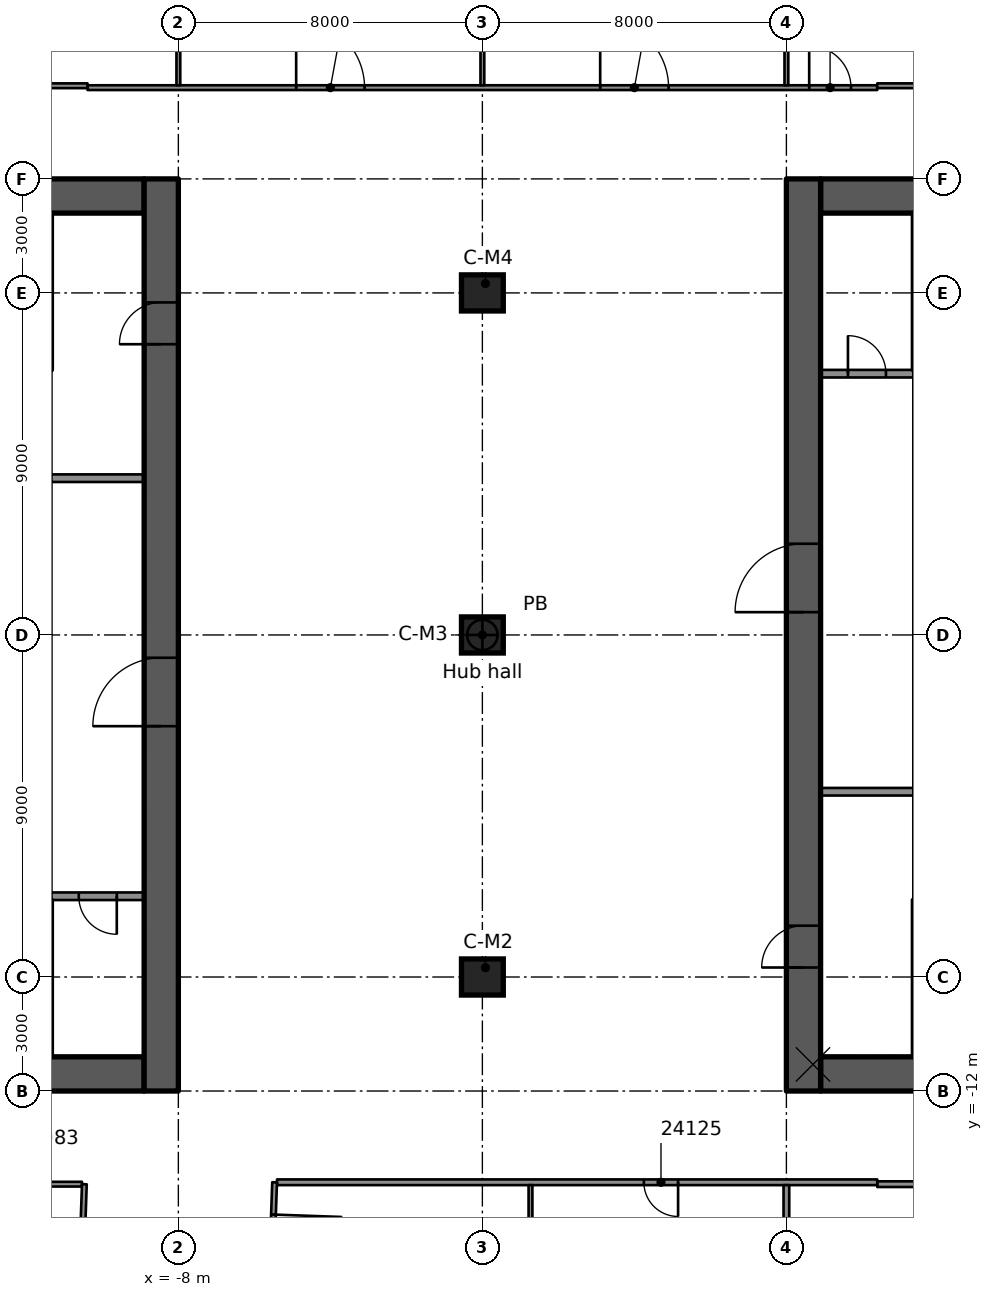
"""IFC4 building model, lengths in metres.
Left out: names, types, materials, properties, quantities, classifications, styles, units other than length and angle.
Written with IfcOpenShell. Run it as: python <this file> out.ifc"""

import sys

from ifc_helpers import new_model, si_unit, direction, frame, frame_2d, origin, origin_2d, place, context, subcontext, project, spatial, rectangle, extrude, element, fill, save


model = new_model("IFC4")
c1 = context("Model", 3, precision=1e-05, world=origin(), true_north=direction((0.0, 1.0)))
c2 = subcontext(c1, "Body", "Model", "MODEL_VIEW")
j1 = project(units=[si_unit("LENGTHUNIT", "METRE"), si_unit("PLANEANGLEUNIT", "RADIAN")], contexts=[c1])
p1 = place(None, origin())
s1 = spatial("IfcSite", under=j1, at=p1, CompositionType="ELEMENT")
p2 = place(p1, origin())
s2 = spatial("IfcBuilding", under=s1, at=p2, CompositionType="ELEMENT")
p3 = place(p2, frame((0.0, 0.0, 123.7)))
s3 = spatial("IfcBuildingStorey", under=s2, at=p3, CompositionType="ELEMENT", Elevation=123.7)
p4 = place(p3, frame((-18.1, 11.55, 0.0), z_axis=(0.0, 0.0, 1.0), x_axis=(1.0, 0.0, 0.0)))
e1 = element("IfcWall", 1, at=p4, inside=s3, PredefinedType="SHEAR", context=c2, shape_type="SweptSolid", body=[
    extrude(rectangle(XDim=9.2, YDim=0.9, at=frame_2d((4.6, 0.0))), origin(), (0.0, 0.0, 1.0), 3.5),
])
p5 = place(p4, frame((5.1, 0.0, 0.0)))
e2 = element("IfcOpeningElement", 2, at=p5, cuts=e1, PredefinedType="OPENING", context=c2, shape_type="SweptSolid", body=[
    extrude(rectangle(XDim=1.1, YDim=2.1, at=frame_2d((0.55, 1.05))), frame((0.0, 0.46, 0.0), z_axis=(0.0, -1.0, 0.0), x_axis=(1.0, 0.0, 0.0)), (0.0, 0.0, 1.0), 0.92),
])
p6 = place(p3, frame((-18.1, -11.55, 0.0), z_axis=(0.0, 0.0, 1.0), x_axis=(1.0, 0.0, 0.0)))
e3 = element("IfcWall", 3, at=p6, inside=s3, PredefinedType="SHEAR", context=c2, shape_type="SweptSolid", body=[
    extrude(rectangle(XDim=9.2, YDim=0.9, at=frame_2d((4.6, 0.0))), origin(), (0.0, 0.0, 1.0), 3.5),
])
p7 = place(p6, frame((5.1, 0.0, 0.0)))
e4 = element("IfcOpeningElement", 4, at=p7, cuts=e3, PredefinedType="OPENING", context=c2, shape_type="SweptSolid", body=[
    extrude(rectangle(XDim=1.1, YDim=2.1, at=frame_2d((0.55, 1.05))), frame((0.0, 0.46, 0.0), z_axis=(0.0, -1.0, 0.0), x_axis=(1.0, 0.0, 0.0)), (0.0, 0.0, 1.0), 0.92),
])
p8 = place(p3, frame((-8.45, -12.0, 0.0), z_axis=(0.0, 0.0, 1.0), x_axis=(0.0, 1.0, 0.0)))
e5 = element("IfcWall", 5, at=p8, inside=s3, PredefinedType="SHEAR", context=c2, shape_type="SweptSolid", body=[
    extrude(rectangle(XDim=24.0, YDim=0.9, at=frame_2d((12.0, 0.0))), origin(), (0.0, 0.0, 1.0), 3.5),
])
p9 = place(p8, frame((9.6, 0.0, 0.0)))
e6 = element("IfcOpeningElement", 6, at=p9, cuts=e5, PredefinedType="OPENING", context=c2, shape_type="SweptSolid", body=[
    extrude(rectangle(XDim=1.8, YDim=2.1, at=frame_2d((0.9, 1.05))), frame((0.0, 0.46, 0.0), z_axis=(0.0, -1.0, 0.0), x_axis=(1.0, 0.0, 0.0)), (0.0, 0.0, 1.0), 0.92),
])
p10 = place(p8, frame((19.65, 0.0, 0.0)))
e7 = element("IfcOpeningElement", 7, at=p10, cuts=e5, PredefinedType="OPENING", context=c2, shape_type="SweptSolid", body=[
    extrude(rectangle(XDim=1.1, YDim=2.1, at=frame_2d((0.55, 1.05))), frame((0.0, 0.46, 0.0), z_axis=(0.0, -1.0, 0.0), x_axis=(1.0, 0.0, 0.0)), (0.0, 0.0, 1.0), 0.92),
])
p11 = place(p3, frame((8.9, 11.55, 0.0), z_axis=(0.0, 0.0, 1.0), x_axis=(1.0, 0.0, 0.0)))
e8 = element("IfcWall", 8, at=p11, inside=s3, PredefinedType="SHEAR", context=c2, shape_type="SweptSolid", body=[
    extrude(rectangle(XDim=9.2, YDim=0.9, at=frame_2d((4.6, 0.0))), origin(), (0.0, 0.0, 1.0), 3.5),
])
p12 = place(p11, frame((3.0, 0.0, 0.0)))
e9 = element("IfcOpeningElement", 9, at=p12, cuts=e8, PredefinedType="OPENING", context=c2, shape_type="SweptSolid", body=[
    extrude(rectangle(XDim=1.1, YDim=2.1, at=frame_2d((0.55, 1.05))), frame((0.0, 0.46, 0.0), z_axis=(0.0, -1.0, 0.0), x_axis=(1.0, 0.0, 0.0)), (0.0, 0.0, 1.0), 0.92),
])
p13 = place(p3, frame((8.9, -11.55, 0.0), z_axis=(0.0, 0.0, 1.0), x_axis=(1.0, 0.0, 0.0)))
e10 = element("IfcWall", 10, at=p13, inside=s3, PredefinedType="SHEAR", context=c2, shape_type="SweptSolid", body=[
    extrude(rectangle(XDim=9.2, YDim=0.9, at=frame_2d((4.6, 0.0))), origin(), (0.0, 0.0, 1.0), 3.5),
])
p14 = place(p13, frame((3.0, 0.0, 0.0)))
e11 = element("IfcOpeningElement", 11, at=p14, cuts=e10, PredefinedType="OPENING", context=c2, shape_type="SweptSolid", body=[
    extrude(rectangle(XDim=1.1, YDim=2.1, at=frame_2d((0.55, 1.05))), frame((0.0, 0.46, 0.0), z_axis=(0.0, -1.0, 0.0), x_axis=(1.0, 0.0, 0.0)), (0.0, 0.0, 1.0), 0.92),
])
p15 = place(p3, frame((8.45, -12.0, 0.0), z_axis=(0.0, 0.0, 1.0), x_axis=(0.0, 1.0, 0.0)))
e12 = element("IfcWall", 12, at=p15, inside=s3, PredefinedType="SHEAR", context=c2, shape_type="SweptSolid", body=[
    extrude(rectangle(XDim=24.0, YDim=0.9, at=frame_2d((12.0, 0.0))), origin(), (0.0, 0.0, 1.0), 3.5),
])
p16 = place(p15, frame((12.6, 0.0, 0.0)))
e13 = element("IfcOpeningElement", 13, at=p16, cuts=e12, PredefinedType="OPENING", context=c2, shape_type="SweptSolid", body=[
    extrude(rectangle(XDim=1.8, YDim=2.1, at=frame_2d((0.9, 1.05))), frame((0.0, 0.46, 0.0), z_axis=(0.0, -1.0, 0.0), x_axis=(1.0, 0.0, 0.0)), (0.0, 0.0, 1.0), 0.92),
])
p17 = place(p15, frame((3.25, 0.0, 0.0)))
e14 = element("IfcOpeningElement", 14, at=p17, cuts=e12, PredefinedType="OPENING", context=c2, shape_type="SweptSolid", body=[
    extrude(rectangle(XDim=1.1, YDim=2.1, at=frame_2d((0.55, 1.05))), frame((0.0, 0.46, 0.0), z_axis=(0.0, -1.0, 0.0), x_axis=(1.0, 0.0, 0.0)), (0.0, 0.0, 1.0), 0.92),
])
for number, where, z_axis, x_axis in (
    (15, (0.0, -9.0, 0.0), (0.0, 0.0, 1.0), (1.0, 0.0, 0.0)),
    (16, (0.0, 0.0, 0.0), (0.0, 0.0, 1.0), (1.0, 0.0, 0.0)),
    (17, (0.0, 9.0, 0.0), (0.0, 0.0, 1.0), (1.0, 0.0, 0.0)),
):
    element("IfcColumn", number, at=place(p3, frame(where, z_axis=z_axis, x_axis=x_axis)), inside=s3, PredefinedType="COLUMN", context=c2, shape_type="SweptSolid", body=[
        extrude(rectangle(XDim=1.1, YDim=0.95, at=origin_2d()), origin(), (0.0, 0.0, 1.0), 3.5),
    ])
p18 = place(p3, frame((-8.9, 4.125, 0.0), z_axis=(0.0, 0.0, 1.0), x_axis=(-1.0, 0.0, 0.0)))
e18 = element("IfcWall", 18, at=p18, inside=s3, PredefinedType="PARTITIONING", context=c2, shape_type="SweptSolid", body=[
    extrude(rectangle(XDim=2.44, YDim=0.2, at=frame_2d((1.22, 0.0))), origin(), (0.0, 0.0, 1.0), 3.09),
])
p19 = place(p3, frame((-8.9, -6.875, 0.0), z_axis=(0.0, 0.0, 1.0), x_axis=(-1.0, 0.0, 0.0)))
e19 = element("IfcWall", 19, at=p19, inside=s3, PredefinedType="PARTITIONING", context=c2, shape_type="SweptSolid", body=[
    extrude(rectangle(XDim=2.44, YDim=0.2, at=frame_2d((1.22, 0.0))), origin(), (0.0, 0.0, 1.0), 3.09),
])
p20 = place(p19, frame((0.72, 0.0, 0.0)))
e20 = element("IfcOpeningElement", 20, at=p20, cuts=e19, PredefinedType="OPENING", context=c2, shape_type="SweptSolid", body=[
    extrude(rectangle(XDim=1.0, YDim=2.1, at=frame_2d((0.5, 1.05))), frame((0.0, 0.11, 0.0), z_axis=(0.0, -1.0, 0.0), x_axis=(1.0, 0.0, 0.0)), (0.0, 0.0, 1.0), 0.22),
])
p21 = place(p3, frame((8.9, -4.125, 0.0), z_axis=(0.0, 0.0, 1.0), x_axis=(1.0, 0.0, 0.0)))
e21 = element("IfcWall", 21, at=p21, inside=s3, PredefinedType="PARTITIONING", context=c2, shape_type="SweptSolid", body=[
    extrude(rectangle(XDim=2.44, YDim=0.2, at=frame_2d((1.22, 0.0))), origin(), (0.0, 0.0, 1.0), 3.09),
])
p22 = place(p3, frame((8.9, 6.875, 0.0), z_axis=(0.0, 0.0, 1.0), x_axis=(1.0, 0.0, 0.0)))
e22 = element("IfcWall", 22, at=p22, inside=s3, PredefinedType="PARTITIONING", context=c2, shape_type="SweptSolid", body=[
    extrude(rectangle(XDim=2.44, YDim=0.2, at=frame_2d((1.22, 0.0))), origin(), (0.0, 0.0, 1.0), 3.09),
])
p23 = place(p22, frame((0.72, 0.0, 0.0)))
e23 = element("IfcOpeningElement", 23, at=p23, cuts=e22, PredefinedType="OPENING", context=c2, shape_type="SweptSolid", body=[
    extrude(rectangle(XDim=1.0, YDim=2.1, at=frame_2d((0.5, 1.05))), frame((0.0, 0.11, 0.0), z_axis=(0.0, -1.0, 0.0), x_axis=(1.0, 0.0, 0.0)), (0.0, 0.0, 1.0), 0.22),
])
p24 = place(p3, frame((-14.595, -14.451, 0.0), z_axis=(0.0, 0.0, 1.0), x_axis=(1.0, 0.0, 0.0)))
e24 = element("IfcWall", 24, at=p24, inside=s3, PredefinedType="PARTITIONING", context=c2, shape_type="SweptSolid", body=[
    extrude(rectangle(XDim=4.059, YDim=0.125, at=frame_2d((2.03, 0.0))), origin(), (0.0, 0.0, 1.0), 3.08),
])
p25 = place(p3, frame((21.387, -14.451, 0.0), z_axis=(0.0, 0.0, 1.0), x_axis=(-1.0, 0.0, 0.0)))
e25 = element("IfcWall", 25, at=p25, inside=s3, PredefinedType="PARTITIONING", context=c2, shape_type="SweptSolid", body=[
    extrude(rectangle(XDim=10.996, YDim=0.15, at=frame_2d((5.498, 0.0))), origin(), (0.0, 0.0, 1.0), 3.08),
])
p26 = place(p25, frame((7.816, 0.0, 0.0)))
e26 = element("IfcOpeningElement", 26, at=p26, cuts=e25, PredefinedType="OPENING", context=c2, shape_type="SweptSolid", body=[
    extrude(rectangle(XDim=0.9, YDim=2.1, at=frame_2d((0.45, 1.05))), frame((0.0, 0.085, 0.0), z_axis=(0.0, -1.0, 0.0), x_axis=(1.0, 0.0, 0.0)), (0.0, 0.0, 1.0), 0.17),
])
p27 = place(p25, frame((2.288, 0.0, 0.0)))
e27 = element("IfcOpeningElement", 27, at=p27, cuts=e25, PredefinedType="OPENING", context=c2, shape_type="SweptSolid", body=[
    extrude(rectangle(XDim=0.9, YDim=2.1, at=frame_2d((0.45, 1.05))), frame((0.0, 0.085, 0.0), z_axis=(0.0, -1.0, 0.0), x_axis=(1.0, 0.0, 0.0)), (0.0, 0.0, 1.0), 0.17),
])
p28 = place(p3, frame((10.391, -14.401, 0.0), z_axis=(0.0, 0.0, 1.0), x_axis=(-1.0, 0.0, 0.0)))
e28 = element("IfcWall", 28, at=p28, inside=s3, PredefinedType="PARTITIONING", context=c2, shape_type="SweptSolid", body=[
    extrude(rectangle(XDim=15.795, YDim=0.15, at=frame_2d((7.897, 0.0))), origin(), (0.0, 0.0, 1.0), 3.08),
])
p29 = place(p28, frame((5.241, 0.0, 0.0)))
e29 = element("IfcOpeningElement", 29, at=p29, cuts=e28, PredefinedType="OPENING", context=c2, shape_type="SweptSolid", body=[
    extrude(rectangle(XDim=0.9, YDim=2.1, at=frame_2d((0.45, 1.05))), frame((0.0, 0.085, 0.0), z_axis=(0.0, -1.0, 0.0), x_axis=(1.0, 0.0, 0.0)), (0.0, 0.0, 1.0), 0.17),
])
p30 = place(p3, frame((-10.39, 14.401, 0.0), z_axis=(0.0, 0.0, 1.0), x_axis=(1.0, 0.0, 0.0)))
e30 = element("IfcWall", 30, at=p30, inside=s3, PredefinedType="PARTITIONING", context=c2, shape_type="SweptSolid", body=[
    extrude(rectangle(XDim=20.781, YDim=0.125, at=frame_2d((10.391, 0.0))), origin(), (0.0, 0.0, 1.0), 3.08),
])
p31 = place(p30, frame((18.99, 0.0, 0.0)))
e31 = element("IfcOpeningElement", 31, at=p31, cuts=e30, PredefinedType="OPENING", context=c2, shape_type="SweptSolid", body=[
    extrude(rectangle(XDim=1.1, YDim=2.1, at=frame_2d((0.55, 1.05))), frame((0.0, 0.073, 0.0), z_axis=(0.0, -1.0, 0.0), x_axis=(1.0, 0.0, 0.0)), (0.0, 0.0, 1.0), 0.145),
])
p32 = place(p30, frame((13.49, 0.0, 0.0)))
e32 = element("IfcOpeningElement", 32, at=p32, cuts=e30, PredefinedType="OPENING", context=c2, shape_type="SweptSolid", body=[
    extrude(rectangle(XDim=1.8, YDim=2.1, at=frame_2d((0.9, 1.05))), frame((0.0, 0.073, 0.0), z_axis=(0.0, -1.0, 0.0), x_axis=(1.0, 0.0, 0.0)), (0.0, 0.0, 1.0), 0.145),
])
p33 = place(p30, frame((5.49, 0.0, 0.0)))
e33 = element("IfcOpeningElement", 33, at=p33, cuts=e30, PredefinedType="OPENING", context=c2, shape_type="SweptSolid", body=[
    extrude(rectangle(XDim=1.8, YDim=2.1, at=frame_2d((0.9, 1.05))), frame((0.0, 0.073, 0.0), z_axis=(0.0, -1.0, 0.0), x_axis=(1.0, 0.0, 0.0)), (0.0, 0.0, 1.0), 0.145),
])
p34 = place(p3, frame((-21.387, 14.451, 0.0), z_axis=(0.0, 0.0, 1.0), x_axis=(1.0, 0.0, 0.0)))
e34 = element("IfcWall", 34, at=p34, inside=s3, PredefinedType="PARTITIONING", context=c2, shape_type="SweptSolid", body=[
    extrude(rectangle(XDim=10.996, YDim=0.125, at=frame_2d((5.498, 0.0))), origin(), (0.0, 0.0, 1.0), 3.08),
])
p35 = place(p34, frame((4.538, 0.0, 0.0)))
e35 = element("IfcOpeningElement", 35, at=p35, cuts=e34, PredefinedType="OPENING", context=c2, shape_type="SweptSolid", body=[
    extrude(rectangle(XDim=1.8, YDim=2.1, at=frame_2d((0.9, 1.05))), frame((0.0, 0.073, 0.0), z_axis=(0.0, -1.0, 0.0), x_axis=(1.0, 0.0, 0.0)), (0.0, 0.0, 1.0), 0.145),
])
p36 = place(p3, frame((10.391, 14.451, 0.0), z_axis=(0.0, 0.0, 1.0), x_axis=(1.0, 0.0, 0.0)))
e36 = element("IfcWall", 36, at=p36, inside=s3, PredefinedType="PARTITIONING", context=c2, shape_type="SweptSolid", body=[
    extrude(rectangle(XDim=10.996, YDim=0.125, at=frame_2d((5.498, 0.0))), origin(), (0.0, 0.0, 1.0), 3.08),
])
p37 = place(p3, frame((-5.467, -14.401, 0.0), z_axis=(0.0, 0.0, 1.0), x_axis=(-0.035380519418, -0.999373913431, 0.0)))
e37 = element("IfcWall", 37, at=p37, inside=s3, PredefinedType="PARTITIONING", context=c2, shape_type="SweptSolid", body=[
    extrude(rectangle(XDim=2.912, YDim=0.125, at=frame_2d((1.456, 0.0))), origin(), (0.0, 0.0, 1.0), 3.08),
])
p38 = place(p37, frame((0.85, 0.0, 0.0)))
e38 = element("IfcOpeningElement", 38, at=p38, cuts=e37, PredefinedType="OPENING", context=c2, shape_type="SweptSolid", body=[
    extrude(rectangle(XDim=1.8, YDim=2.1, at=frame_2d((0.9, 1.05))), frame((0.0, 0.073, 0.0), z_axis=(0.0, -1.0, 0.0), x_axis=(1.0, 0.0, 0.0)), (0.0, 0.0, 1.0), 0.145),
])
p39 = place(p3, frame((-10.873, -25.813, 0.0), z_axis=(0.0, 0.0, 1.0), x_axis=(0.035198976063, 0.999380324043, 0.0)))
e39 = element("IfcWall", 39, at=p39, inside=s3, PredefinedType="PARTITIONING", context=c2, shape_type="SweptSolid", body=[
    extrude(rectangle(XDim=11.368, YDim=0.125, at=frame_2d((5.684, 0.0))), origin(), (0.0, 0.0, 1.0), 3.08),
])
p40 = place(p39, frame((3.6, 0.0, 0.0)))
e40 = element("IfcOpeningElement", 40, at=p40, cuts=e39, PredefinedType="OPENING", context=c2, shape_type="SweptSolid", body=[
    extrude(rectangle(XDim=0.9, YDim=2.1, at=frame_2d((0.45, 1.05))), frame((0.0, 0.073, 0.0), z_axis=(0.0, -1.0, 0.0), x_axis=(1.0, 0.0, 0.0)), (0.0, 0.0, 1.0), 0.145),
])
p41 = place(p3, frame((8.0, -31.635, 0.0), z_axis=(0.0, 0.0, 1.0), x_axis=(0.0, 1.0, 0.0)))
e41 = element("IfcWall", 41, at=p41, inside=s3, PredefinedType="PARTITIONING", context=c2, shape_type="SweptSolid", body=[
    extrude(rectangle(XDim=17.159, YDim=0.15, at=frame_2d((8.58, 0.0))), origin(), (0.0, 0.0, 1.0), 3.08),
])
p42 = place(p3, frame((8.0, 14.463, 0.0), z_axis=(0.0, 0.0, 1.0), x_axis=(0.0, 1.0, 0.0)))
e42 = element("IfcWall", 42, at=p42, inside=s3, PredefinedType="PARTITIONING", context=c2, shape_type="SweptSolid", body=[
    extrude(rectangle(XDim=14.719, YDim=0.1, at=frame_2d((7.359, 0.0))), origin(), (0.0, 0.0, 1.0), 3.08),
])
p43 = place(p3, frame((1.266, -35.229, 0.0), z_axis=(0.0, 0.0, 1.0), x_axis=(0.0, 1.0, 0.0)))
e43 = element("IfcWall", 43, at=p43, inside=s3, PredefinedType="PARTITIONING", context=c2, shape_type="SweptSolid", body=[
    extrude(rectangle(XDim=20.753, YDim=0.1, at=frame_2d((10.376, 0.0))), origin(), (0.0, 0.0, 1.0), 3.08),
])
p44 = place(p3, frame((0.0, 14.463, 0.0), z_axis=(0.0, 0.0, 1.0), x_axis=(0.0, 1.0, 0.0)))
e44 = element("IfcWall", 44, at=p44, inside=s3, PredefinedType="PARTITIONING", context=c2, shape_type="SweptSolid", body=[
    extrude(rectangle(XDim=17.114, YDim=0.1, at=frame_2d((8.557, 0.0))), origin(), (0.0, 0.0, 1.0), 3.08),
])
p45 = place(p3, frame((-8.0, 14.463, 0.0), z_axis=(0.0, 0.0, 1.0), x_axis=(0.0, 1.0, 0.0)))
e45 = element("IfcWall", 45, at=p45, inside=s3, PredefinedType="PARTITIONING", context=c2, shape_type="SweptSolid", body=[
    extrude(rectangle(XDim=15.591, YDim=0.1, at=frame_2d((7.795, 0.0))), origin(), (0.0, 0.0, 1.0), 3.08),
])
p46 = place(p9, origin())
e46 = element("IfcDoor", 46, at=p46, inside=s3, OperationType="SINGLE_SWING_LEFT", PredefinedType="DOOR", context=c2, shape_type="SweptSolid", body=[
    extrude(rectangle(XDim=1.8, YDim=2.1, at=frame_2d((0.9, 1.05))), frame((0.0, 0.025, 0.0), z_axis=(0.0, -1.0, 0.0), x_axis=(1.0, 0.0, 0.0)), (0.0, 0.0, 1.0), 0.05),
])
fill(e6, e46)
p47 = place(p10, origin())
e47 = element("IfcDoor", 47, at=p47, inside=s3, OperationType="SINGLE_SWING_RIGHT", PredefinedType="DOOR", context=c2, shape_type="SweptSolid", body=[
    extrude(rectangle(XDim=1.1, YDim=2.1, at=frame_2d((0.55, 1.05))), frame((0.0, 0.025, 0.0), z_axis=(0.0, -1.0, 0.0), x_axis=(1.0, 0.0, 0.0)), (0.0, 0.0, 1.0), 0.05),
])
fill(e7, e47)
p48 = place(p20, origin())
e48 = element("IfcDoor", 48, at=p48, inside=s3, OperationType="SINGLE_SWING_RIGHT", PredefinedType="DOOR", context=c2, shape_type="SweptSolid", body=[
    extrude(rectangle(XDim=1.0, YDim=2.1, at=frame_2d((0.5, 1.05))), frame((0.0, 0.025, 0.0), z_axis=(0.0, -1.0, 0.0), x_axis=(1.0, 0.0, 0.0)), (0.0, 0.0, 1.0), 0.05),
])
fill(e20, e48)
p49 = place(p16, origin())
e49 = element("IfcDoor", 49, at=p49, inside=s3, OperationType="SINGLE_SWING_RIGHT", PredefinedType="DOOR", context=c2, shape_type="SweptSolid", body=[
    extrude(rectangle(XDim=1.8, YDim=2.1, at=frame_2d((0.9, 1.05))), frame((0.0, 0.025, 0.0), z_axis=(0.0, -1.0, 0.0), x_axis=(1.0, 0.0, 0.0)), (0.0, 0.0, 1.0), 0.05),
])
fill(e13, e49)
p50 = place(p17, origin())
e50 = element("IfcDoor", 50, at=p50, inside=s3, OperationType="SINGLE_SWING_LEFT", PredefinedType="DOOR", context=c2, shape_type="SweptSolid", body=[
    extrude(rectangle(XDim=1.1, YDim=2.1, at=frame_2d((0.55, 1.05))), frame((0.0, 0.025, 0.0), z_axis=(0.0, -1.0, 0.0), x_axis=(1.0, 0.0, 0.0)), (0.0, 0.0, 1.0), 0.05),
])
fill(e14, e50)
p51 = place(p23, origin())
e51 = element("IfcDoor", 51, at=p51, inside=s3, OperationType="SINGLE_SWING_RIGHT", PredefinedType="DOOR", context=c2, shape_type="SweptSolid", body=[
    extrude(rectangle(XDim=1.0, YDim=2.1, at=frame_2d((0.5, 1.05))), frame((0.0, 0.025, 0.0), z_axis=(0.0, -1.0, 0.0), x_axis=(1.0, 0.0, 0.0)), (0.0, 0.0, 1.0), 0.05),
])
fill(e23, e51)
p52 = place(p38, origin())
e52 = element("IfcDoor", 52, at=p52, inside=s3, OperationType="DOUBLE_DOOR_SINGLE_SWING", PredefinedType="DOOR", context=c2, shape_type="SweptSolid", body=[
    extrude(rectangle(XDim=1.8, YDim=2.1, at=frame_2d((0.9, 1.05))), frame((0.0, 0.025, 0.0), z_axis=(0.0, -1.0, 0.0), x_axis=(1.0, 0.0, 0.0)), (0.0, 0.0, 1.0), 0.05),
])
fill(e38, e52)
p53 = place(p29, origin())
e53 = element("IfcDoor", 53, at=p53, inside=s3, OperationType="SINGLE_SWING_LEFT", PredefinedType="DOOR", context=c2, shape_type="SweptSolid", body=[
    extrude(rectangle(XDim=0.9, YDim=2.1, at=frame_2d((0.45, 1.05))), frame((0.0, 0.025, 0.0), z_axis=(0.0, -1.0, 0.0), x_axis=(1.0, 0.0, 0.0)), (0.0, 0.0, 1.0), 0.05),
])
fill(e29, e53)
p54 = place(p31, origin())
e54 = element("IfcDoor", 54, at=p54, inside=s3, OperationType="SINGLE_SWING_RIGHT", PredefinedType="DOOR", context=c2, shape_type="SweptSolid", body=[
    extrude(rectangle(XDim=1.1, YDim=2.1, at=frame_2d((0.55, 1.05))), frame((0.0, 0.025, 0.0), z_axis=(0.0, -1.0, 0.0), x_axis=(1.0, 0.0, 0.0)), (0.0, 0.0, 1.0), 0.05),
])
fill(e31, e54)
p55 = place(p32, origin())
e55 = element("IfcDoor", 55, at=p55, inside=s3, OperationType="DOUBLE_DOOR_SINGLE_SWING", PredefinedType="DOOR", context=c2, shape_type="SweptSolid", body=[
    extrude(rectangle(XDim=1.8, YDim=2.1, at=frame_2d((0.9, 1.05))), frame((0.0, 0.025, 0.0), z_axis=(0.0, -1.0, 0.0), x_axis=(1.0, 0.0, 0.0)), (0.0, 0.0, 1.0), 0.05),
])
fill(e32, e55)
p56 = place(p33, origin())
e56 = element("IfcDoor", 56, at=p56, inside=s3, OperationType="DOUBLE_DOOR_SINGLE_SWING", PredefinedType="DOOR", context=c2, shape_type="SweptSolid", body=[
    extrude(rectangle(XDim=1.8, YDim=2.1, at=frame_2d((0.9, 1.05))), frame((0.0, 0.025, 0.0), z_axis=(0.0, -1.0, 0.0), x_axis=(1.0, 0.0, 0.0)), (0.0, 0.0, 1.0), 0.05),
])
fill(e33, e56)
save(model, sys.argv[1])
